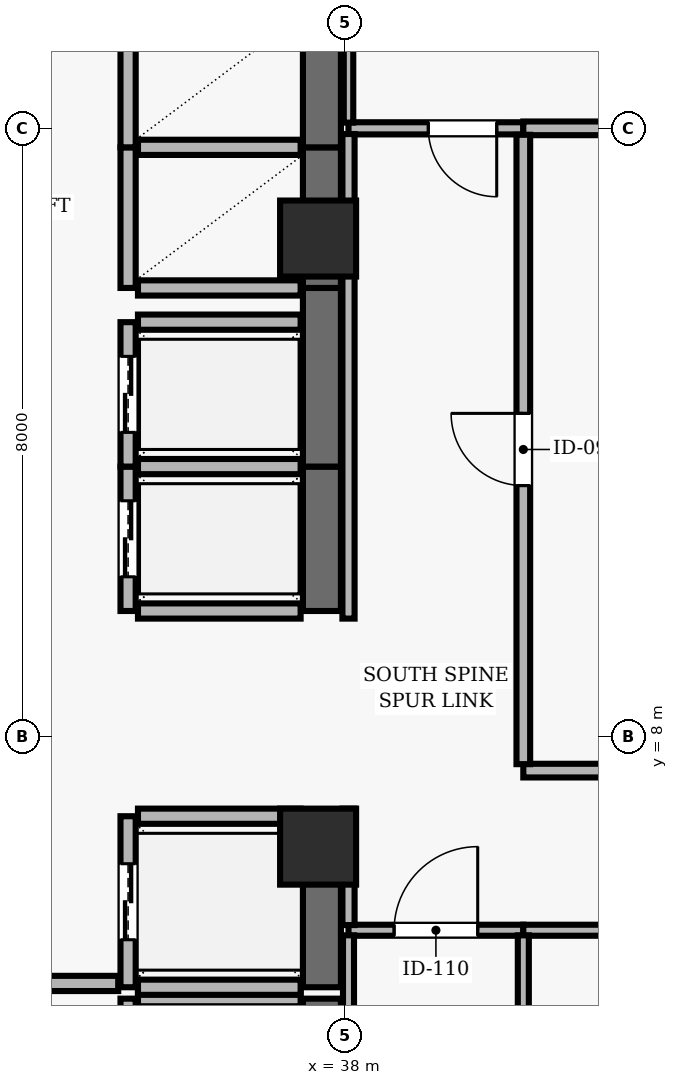
"""IFC4 building model, lengths in metres.
Left out: names, types, materials, properties, quantities, classifications, styles, units other than length and angle.
Written with IfcOpenShell. Run it as: python <this file> out.ifc"""

import sys

from ifc_helpers import new_model, si_unit, direction, frame, frame_2d, origin, origin_2d, place, context, subcontext, project, spatial, rectangle, extrude, element, fill, save


model = new_model("IFC4")
c1 = context("Model", 3, precision=1e-05, world=origin(), true_north=direction((0.0, 1.0)))
c2 = subcontext(c1, "Body", "Model", "MODEL_VIEW")
j1 = project(units=[si_unit("LENGTHUNIT", "METRE"), si_unit("PLANEANGLEUNIT", "RADIAN")], contexts=[c1])
p1 = place(None, origin())
s1 = spatial("IfcSite", under=j1, at=p1, CompositionType="ELEMENT")
p2 = place(p1, origin())
s2 = spatial("IfcBuilding", under=s1, at=p2, CompositionType="ELEMENT")
p3 = place(p2, frame((0.0, 0.0, 207.0)))
s3 = spatial("IfcBuildingStorey", under=s2, at=p3, CompositionType="ELEMENT", Elevation=207.0)
for number, where, z_axis, x_axis in (
    (1, (37.65, 6.55, 0.0), (0.0, 0.0, 1.0), (1.0, 0.0, 0.0)),
    (2, (37.65, 14.55, 0.0), (0.0, 0.0, 1.0), (1.0, 0.0, 0.0)),
):
    element("IfcColumn", number, at=place(p3, frame(where, z_axis=z_axis, x_axis=x_axis)), inside=s3, PredefinedType="COLUMN", context=c2, shape_type="SweptSolid", body=[
        extrude(rectangle(XDim=1.0, YDim=1.0, at=origin_2d()), origin(), (0.0, 0.0, 1.0), 3.9),
    ])
p4 = place(p3, frame((35.15, 4.55, 0.0), z_axis=(0.0, 0.0, 1.0), x_axis=(0.0, -1.0, 0.0)))
e3 = element("IfcWall", 3, at=p4, inside=s3, PredefinedType="SOLIDWALL", context=c2, shape_type="SweptSolid", body=[
    extrude(rectangle(XDim=2.1, YDim=0.2, at=frame_2d((1.05, 0.0))), origin(), (0.0, 0.0, 1.0), 3.69),
])
p5 = place(p4, frame((0.45, 0.0, 0.0)))
e4 = element("IfcOpeningElement", 4, at=p5, cuts=e3, PredefinedType="OPENING", context=c2, shape_type="SweptSolid", body=[
    extrude(rectangle(XDim=1.2, YDim=2.15, at=frame_2d((0.6, 1.075))), frame((0.0, 0.11, 0.0), z_axis=(0.0, -1.0, 0.0), x_axis=(1.0, 0.0, 0.0)), (0.0, 0.0, 1.0), 0.22),
])
p6 = place(p3, frame((37.7, 2.45, 0.0), z_axis=(0.0, 0.0, 1.0), x_axis=(0.0, 1.0, 0.0)))
e5 = element("IfcWall", 5, at=p6, inside=s3, PredefinedType="SHEAR", context=c2, shape_type="SweptSolid", body=[
    extrude(rectangle(XDim=2.1, YDim=0.5, at=frame_2d((1.05, 0.0))), origin(), (0.0, 0.0, 1.0), 3.69),
])
p7 = place(p3, frame((37.42, 4.55, 0.0), z_axis=(0.0, 0.0, 1.0), x_axis=(-1.0, 0.0, 0.0)))
e6 = element("IfcWall", 6, at=p7, inside=s3, PredefinedType="SOLIDWALL", context=c2, shape_type="SweptSolid", body=[
    extrude(rectangle(XDim=2.14, YDim=0.2, at=frame_2d((1.07, 0.0))), origin(), (0.0, 0.0, 1.0), 3.69),
])
p8 = place(p3, frame((35.15, 6.95, 0.0), z_axis=(0.0, 0.0, 1.0), x_axis=(0.0, -1.0, 0.0)))
e7 = element("IfcWall", 7, at=p8, inside=s3, PredefinedType="SOLIDWALL", context=c2, shape_type="SweptSolid", body=[
    extrude(rectangle(XDim=2.25, YDim=0.2, at=frame_2d((1.125, 0.0))), origin(), (0.0, 0.0, 1.0), 3.69),
])
p9 = place(p8, frame((0.625, 0.0, 0.0)))
e8 = element("IfcOpeningElement", 8, at=p9, cuts=e7, PredefinedType="OPENING", context=c2, shape_type="SweptSolid", body=[
    extrude(rectangle(XDim=1.0, YDim=2.1, at=frame_2d((0.5, 1.05))), frame((0.0, 0.11, 0.0), z_axis=(0.0, -1.0, 0.0), x_axis=(1.0, 0.0, 0.0)), (0.0, 0.0, 1.0), 0.22),
])
p10 = place(p3, frame((37.7, 4.7, 0.0), z_axis=(0.0, 0.0, 1.0), x_axis=(0.0, 1.0, 0.0)))
e9 = element("IfcWall", 9, at=p10, inside=s3, PredefinedType="SHEAR", context=c2, shape_type="SweptSolid", body=[
    extrude(rectangle(XDim=2.25, YDim=0.5, at=frame_2d((1.125, 0.0))), origin(), (0.0, 0.0, 1.0), 3.69),
])
for number, where, z_axis, x_axis in (
    (10, (35.28, 4.7, 0.0), (0.0, 0.0, 1.0), (1.0, 0.0, 0.0)),
    (11, (37.42, 6.95, 0.0), (0.0, 0.0, 1.0), (-1.0, 0.0, 0.0)),
):
    element("IfcWall", number, at=place(p3, frame(where, z_axis=z_axis, x_axis=x_axis)), inside=s3, PredefinedType="SOLIDWALL", context=c2, shape_type="SweptSolid", body=[
        extrude(rectangle(XDim=2.14, YDim=0.2, at=frame_2d((1.07, 0.0))), origin(), (0.0, 0.0, 1.0), 3.69),
    ])
p11 = place(p3, frame((35.15, 11.55, 0.0), z_axis=(0.0, 0.0, 1.0), x_axis=(0.0, -1.0, 0.0)))
e12 = element("IfcWall", 12, at=p11, inside=s3, PredefinedType="SOLIDWALL", context=c2, shape_type="SweptSolid", body=[
    extrude(rectangle(XDim=1.9, YDim=0.2, at=frame_2d((0.95, 0.0))), origin(), (0.0, 0.0, 1.0), 3.69),
])
p12 = place(p11, frame((0.45, 0.0, 0.0)))
e13 = element("IfcOpeningElement", 13, at=p12, cuts=e12, PredefinedType="OPENING", context=c2, shape_type="SweptSolid", body=[
    extrude(rectangle(XDim=1.0, YDim=2.1, at=frame_2d((0.5, 1.05))), frame((0.0, 0.11, 0.0), z_axis=(0.0, -1.0, 0.0), x_axis=(1.0, 0.0, 0.0)), (0.0, 0.0, 1.0), 0.22),
])
p13 = place(p3, frame((37.7, 9.65, 0.0), z_axis=(0.0, 0.0, 1.0), x_axis=(0.0, 1.0, 0.0)))
e14 = element("IfcWall", 14, at=p13, inside=s3, PredefinedType="SHEAR", context=c2, shape_type="SweptSolid", body=[
    extrude(rectangle(XDim=1.9, YDim=0.5, at=frame_2d((0.95, 0.0))), origin(), (0.0, 0.0, 1.0), 3.69),
])
for number, where, z_axis, x_axis in (
    (15, (35.28, 9.65, 0.0), (0.0, 0.0, 1.0), (1.0, 0.0, 0.0)),
    (16, (37.42, 11.55, 0.0), (0.0, 0.0, 1.0), (-1.0, 0.0, 0.0)),
):
    element("IfcWall", number, at=place(p3, frame(where, z_axis=z_axis, x_axis=x_axis)), inside=s3, PredefinedType="SOLIDWALL", context=c2, shape_type="SweptSolid", body=[
        extrude(rectangle(XDim=2.14, YDim=0.2, at=frame_2d((1.07, 0.0))), origin(), (0.0, 0.0, 1.0), 3.69),
    ])
p14 = place(p3, frame((35.15, 13.45, 0.0), z_axis=(0.0, 0.0, 1.0), x_axis=(0.0, -1.0, 0.0)))
e17 = element("IfcWall", 17, at=p14, inside=s3, PredefinedType="SOLIDWALL", context=c2, shape_type="SweptSolid", body=[
    extrude(rectangle(XDim=1.9, YDim=0.2, at=frame_2d((0.95, 0.0))), origin(), (0.0, 0.0, 1.0), 3.69),
])
p15 = place(p14, frame((0.45, 0.0, 0.0)))
e18 = element("IfcOpeningElement", 18, at=p15, cuts=e17, PredefinedType="OPENING", context=c2, shape_type="SweptSolid", body=[
    extrude(rectangle(XDim=1.0, YDim=2.1, at=frame_2d((0.5, 1.05))), frame((0.0, 0.11, 0.0), z_axis=(0.0, -1.0, 0.0), x_axis=(1.0, 0.0, 0.0)), (0.0, 0.0, 1.0), 0.22),
])
p16 = place(p3, frame((37.7, 11.55, 0.0), z_axis=(0.0, 0.0, 1.0), x_axis=(0.0, 1.0, 0.0)))
e19 = element("IfcWall", 19, at=p16, inside=s3, PredefinedType="SHEAR", context=c2, shape_type="SweptSolid", body=[
    extrude(rectangle(XDim=2.35, YDim=0.5, at=frame_2d((1.175, 0.0))), origin(), (0.0, 0.0, 1.0), 3.69),
])
p17 = place(p3, frame((37.42, 13.45, 0.0), z_axis=(0.0, 0.0, 1.0), x_axis=(-1.0, 0.0, 0.0)))
e20 = element("IfcWall", 20, at=p17, inside=s3, PredefinedType="SOLIDWALL", context=c2, shape_type="SweptSolid", body=[
    extrude(rectangle(XDim=2.14, YDim=0.2, at=frame_2d((1.07, 0.0))), origin(), (0.0, 0.0, 1.0), 3.69),
])
p18 = place(p3, frame((35.15, 15.75, 0.0), z_axis=(0.0, 0.0, 1.0), x_axis=(0.0, -1.0, 0.0)))
e21 = element("IfcWall", 21, at=p18, inside=s3, PredefinedType="SOLIDWALL", context=c2, shape_type="SweptSolid", body=[
    extrude(rectangle(XDim=1.85, YDim=0.2, at=frame_2d((0.925, 0.0))), origin(), (0.0, 0.0, 1.0), 3.69),
])
p19 = place(p3, frame((37.7, 13.9, 0.0), z_axis=(0.0, 0.0, 1.0), x_axis=(0.0, 1.0, 0.0)))
e22 = element("IfcWall", 22, at=p19, inside=s3, PredefinedType="SHEAR", context=c2, shape_type="SweptSolid", body=[
    extrude(rectangle(XDim=1.85, YDim=0.5, at=frame_2d((0.925, 0.0))), origin(), (0.0, 0.0, 1.0), 3.69),
])
for number, where, z_axis, x_axis in (
    (23, (35.28, 13.9, 0.0), (0.0, 0.0, 1.0), (1.0, 0.0, 0.0)),
    (24, (37.42, 15.75, 0.0), (0.0, 0.0, 1.0), (-1.0, 0.0, 0.0)),
):
    element("IfcWall", number, at=place(p3, frame(where, z_axis=z_axis, x_axis=x_axis)), inside=s3, PredefinedType="SOLIDWALL", context=c2, shape_type="SweptSolid", body=[
        extrude(rectangle(XDim=2.14, YDim=0.2, at=frame_2d((1.07, 0.0))), origin(), (0.0, 0.0, 1.0), 3.69),
    ])
p20 = place(p3, frame((35.15, 17.6, 0.0), z_axis=(0.0, 0.0, 1.0), x_axis=(0.0, -1.0, 0.0)))
e25 = element("IfcWall", 25, at=p20, inside=s3, PredefinedType="SOLIDWALL", context=c2, shape_type="SweptSolid", body=[
    extrude(rectangle(XDim=1.85, YDim=0.2, at=frame_2d((0.925, 0.0))), origin(), (0.0, 0.0, 1.0), 3.69),
])
p21 = place(p3, frame((37.7, 15.75, 0.0), z_axis=(0.0, 0.0, 1.0), x_axis=(0.0, 1.0, 0.0)))
e26 = element("IfcWall", 26, at=p21, inside=s3, PredefinedType="SHEAR", context=c2, shape_type="SweptSolid", body=[
    extrude(rectangle(XDim=1.85, YDim=0.5, at=frame_2d((0.925, 0.0))), origin(), (0.0, 0.0, 1.0), 3.69),
])
p22 = place(p3, frame((35.02, 4.75, 0.0), z_axis=(0.0, 0.0, 1.0), x_axis=(-1.0, 0.0, 0.0)))
e27 = element("IfcWall", 27, at=p22, inside=s3, PredefinedType="SOLIDWALL", context=c2, shape_type="SweptSolid", body=[
    extrude(rectangle(XDim=3.11, YDim=0.2, at=frame_2d((1.555, 0.0))), origin(), (0.0, 0.0, 1.0), 3.69),
])
p23 = place(p22, frame((1.03, 0.0, 0.0)))
e28 = element("IfcOpeningElement", 28, at=p23, cuts=e27, PredefinedType="OPENING", context=c2, shape_type="SweptSolid", body=[
    extrude(rectangle(XDim=1.05, YDim=2.15, at=frame_2d((0.525, 1.075))), frame((0.0, 0.11, 0.0), z_axis=(0.0, -1.0, 0.0), x_axis=(1.0, 0.0, 0.0)), (0.0, 0.0, 1.0), 0.22),
])
p24 = place(p3, frame((38.05, 5.45, 0.0), z_axis=(0.0, 0.0, 1.0), x_axis=(1.0, 0.0, 0.0)))
e29 = element("IfcWall", 29, at=p24, inside=s3, PredefinedType="PARTITIONING", context=c2, shape_type="SweptSolid", body=[
    extrude(rectangle(XDim=2.3, YDim=0.145, at=frame_2d((1.15, 0.0))), origin(), (0.0, 0.0, 1.0), 3.343),
])
p25 = place(p24, frame((0.6, 0.0, 0.0)))
e30 = element("IfcOpeningElement", 30, at=p25, cuts=e29, PredefinedType="OPENING", context=c2, shape_type="SweptSolid", body=[
    extrude(rectangle(XDim=1.1, YDim=2.15, at=frame_2d((0.55, 1.075))), frame((0.0, 0.083, 0.0), z_axis=(0.0, -1.0, 0.0), x_axis=(1.0, 0.0, 0.0)), (0.0, 0.0, 1.0), 0.165),
])
p26 = place(p3, frame((40.35, 5.45, 0.0), z_axis=(0.0, 0.0, 1.0), x_axis=(1.0, 0.0, 0.0)))
e31 = element("IfcWall", 31, at=p26, inside=s3, PredefinedType="PARTITIONING", context=c2, shape_type="SweptSolid", body=[
    extrude(rectangle(XDim=5.65, YDim=0.145, at=frame_2d((2.825, 0.0))), origin(), (0.0, 0.0, 1.0), 3.343),
])
p27 = place(p26, frame((2.275, 0.0, 0.0)))
e32 = element("IfcOpeningElement", 32, at=p27, cuts=e31, PredefinedType="OPENING", context=c2, shape_type="SweptSolid", body=[
    extrude(rectangle(XDim=1.1, YDim=2.15, at=frame_2d((0.55, 1.075))), frame((0.0, 0.083, 0.0), z_axis=(0.0, -1.0, 0.0), x_axis=(1.0, 0.0, 0.0)), (0.0, 0.0, 1.0), 0.165),
])
p28 = place(p3, frame((40.35, 16.0, 0.0), z_axis=(0.0, 0.0, 1.0), x_axis=(-1.0, 0.0, 0.0)))
e33 = element("IfcWall", 33, at=p28, inside=s3, PredefinedType="PARTITIONING", context=c2, shape_type="SweptSolid", body=[
    extrude(rectangle(XDim=2.3, YDim=0.16, at=frame_2d((1.15, 0.0))), origin(), (0.0, 0.0, 1.0), 3.69),
])
p29 = place(p28, frame((0.35, 0.0, 0.0)))
e34 = element("IfcOpeningElement", 34, at=p29, cuts=e33, PredefinedType="OPENING", context=c2, shape_type="SweptSolid", body=[
    extrude(rectangle(XDim=0.9, YDim=2.1, at=frame_2d((0.45, 1.05))), frame((0.0, 0.09, 0.0), z_axis=(0.0, -1.0, 0.0), x_axis=(1.0, 0.0, 0.0)), (0.0, 0.0, 1.0), 0.18),
])
p30 = place(p3, frame((40.35, 16.0, 0.0), z_axis=(0.0, 0.0, 1.0), x_axis=(1.0, 0.0, 0.0)))
e35 = element("IfcWall", 35, at=p30, inside=s3, PredefinedType="PARTITIONING", context=c2, shape_type="SweptSolid", body=[
    extrude(rectangle(XDim=5.155, YDim=0.18, at=frame_2d((2.577, 0.0))), origin(), (0.0, 0.0, 1.0), 3.69),
])
p31 = place(p3, frame((46.0, 7.55, 0.0), z_axis=(0.0, 0.0, 1.0), x_axis=(-1.0, 0.0, 0.0)))
e36 = element("IfcWall", 36, at=p31, inside=s3, PredefinedType="PARTITIONING", context=c2, shape_type="SweptSolid", body=[
    extrude(rectangle(XDim=5.65, YDim=0.18, at=frame_2d((2.825, 0.0))), origin(), (0.0, 0.0, 1.0), 3.139),
])
p32 = place(p3, frame((38.05, 5.383, 0.0), z_axis=(0.0, 0.0, 1.0), x_axis=(0.0, -1.0, 0.0)))
e37 = element("IfcWall", 37, at=p32, inside=s3, PredefinedType="PARTITIONING", context=c2, shape_type="SweptSolid", body=[
    extrude(rectangle(XDim=5.238, YDim=0.145, at=frame_2d((2.619, 0.0))), origin(), (0.0, 0.0, 1.0), 3.139),
])
p33 = place(p3, frame((38.05, 7.05, 0.0), z_axis=(0.0, 0.0, 1.0), x_axis=(0.0, -1.0, 0.0)))
e38 = element("IfcWall", 38, at=p33, inside=s3, PredefinedType="PARTITIONING", context=c2, shape_type="SweptSolid", body=[
    extrude(rectangle(XDim=1.532, YDim=0.16, at=frame_2d((0.766, 0.0))), origin(), (0.0, 0.0, 1.0), 3.139),
])
p34 = place(p3, frame((38.05, 15.925, 0.0), z_axis=(0.0, 0.0, 1.0), x_axis=(0.0, -1.0, 0.0)))
e39 = element("IfcWall", 39, at=p34, inside=s3, PredefinedType="PARTITIONING", context=c2, shape_type="SweptSolid", body=[
    extrude(rectangle(XDim=6.375, YDim=0.16, at=frame_2d((3.188, 0.0))), origin(), (0.0, 0.0, 1.0), 3.139),
])
p35 = place(p3, frame((38.05, 22.538, 0.0), z_axis=(0.0, 0.0, 1.0), x_axis=(0.0, -1.0, 0.0)))
e40 = element("IfcWall", 40, at=p35, inside=s3, PredefinedType="PARTITIONING", context=c2, shape_type="SweptSolid", body=[
    extrude(rectangle(XDim=6.463, YDim=0.125, at=frame_2d((3.231, 0.0))), origin(), (0.0, 0.0, 1.0), 3.139),
])
p36 = place(p3, frame((40.35, 0.09, 0.0), z_axis=(0.0, 0.0, 1.0), x_axis=(0.0, 1.0, 0.0)))
e41 = element("IfcWall", 41, at=p36, inside=s3, PredefinedType="PARTITIONING", context=c2, shape_type="SweptSolid", body=[
    extrude(rectangle(XDim=5.293, YDim=0.145, at=frame_2d((2.646, 0.0))), origin(), (0.0, 0.0, 1.0), 3.69),
])
p37 = place(p3, frame((40.35, 7.635, 0.0), z_axis=(0.0, 0.0, 1.0), x_axis=(0.0, 1.0, 0.0)))
e42 = element("IfcWall", 42, at=p37, inside=s3, PredefinedType="PARTITIONING", context=c2, shape_type="SweptSolid", body=[
    extrude(rectangle(XDim=8.28, YDim=0.18, at=frame_2d((4.14, 0.0))), origin(), (0.0, 0.0, 1.0), 3.343),
])
p38 = place(p37, frame((3.665, 0.0, 0.0)))
e43 = element("IfcOpeningElement", 43, at=p38, cuts=e42, PredefinedType="OPENING", context=c2, shape_type="SweptSolid", body=[
    extrude(rectangle(XDim=0.95, YDim=2.1, at=frame_2d((0.475, 1.05))), frame((0.0, 0.1, 0.0), z_axis=(0.0, -1.0, 0.0), x_axis=(1.0, 0.0, 0.0)), (0.0, 0.0, 1.0), 0.2),
])
p39 = place(p9, origin())
e44 = element("IfcDoor", 44, at=p39, inside=s3, OperationType="DOUBLE_DOOR_SLIDING", PredefinedType="DOOR", context=c2, shape_type="SweptSolid", body=[
    extrude(rectangle(XDim=1.0, YDim=2.1, at=frame_2d((0.5, 1.05))), frame((0.0, 0.025, 0.0), z_axis=(0.0, -1.0, 0.0), x_axis=(1.0, 0.0, 0.0)), (0.0, 0.0, 1.0), 0.05),
])
fill(e8, e44)
p40 = place(p12, origin())
e45 = element("IfcDoor", 45, at=p40, inside=s3, OperationType="DOUBLE_DOOR_SLIDING", PredefinedType="DOOR", context=c2, shape_type="SweptSolid", body=[
    extrude(rectangle(XDim=1.0, YDim=2.1, at=frame_2d((0.5, 1.05))), frame((0.0, 0.025, 0.0), z_axis=(0.0, -1.0, 0.0), x_axis=(1.0, 0.0, 0.0)), (0.0, 0.0, 1.0), 0.05),
])
fill(e13, e45)
p41 = place(p15, origin())
e46 = element("IfcDoor", 46, at=p41, inside=s3, OperationType="DOUBLE_DOOR_SLIDING", PredefinedType="DOOR", context=c2, shape_type="SweptSolid", body=[
    extrude(rectangle(XDim=1.0, YDim=2.1, at=frame_2d((0.5, 1.05))), frame((0.0, 0.025, 0.0), z_axis=(0.0, -1.0, 0.0), x_axis=(1.0, 0.0, 0.0)), (0.0, 0.0, 1.0), 0.05),
])
fill(e18, e46)
p42 = place(p25, origin())
e47 = element("IfcDoor", 47, at=p42, inside=s3, OperationType="SINGLE_SWING_RIGHT", PredefinedType="DOOR", context=c2, shape_type="SweptSolid", body=[
    extrude(rectangle(XDim=1.1, YDim=2.15, at=frame_2d((0.55, 1.075))), frame((0.0, 0.025, 0.0), z_axis=(0.0, -1.0, 0.0), x_axis=(1.0, 0.0, 0.0)), (0.0, 0.0, 1.0), 0.05),
])
fill(e30, e47)
p43 = place(p38, origin())
e48 = element("IfcDoor", 48, at=p43, inside=s3, OperationType="SINGLE_SWING_RIGHT", PredefinedType="DOOR", context=c2, shape_type="SweptSolid", body=[
    extrude(rectangle(XDim=0.95, YDim=2.1, at=frame_2d((0.475, 1.05))), frame((0.0, 0.025, 0.0), z_axis=(0.0, -1.0, 0.0), x_axis=(1.0, 0.0, 0.0)), (0.0, 0.0, 1.0), 0.05),
])
fill(e43, e48)
p44 = place(p29, origin())
e49 = element("IfcDoor", 49, at=p44, inside=s3, OperationType="SINGLE_SWING_LEFT", PredefinedType="DOOR", context=c2, shape_type="SweptSolid", body=[
    extrude(rectangle(XDim=0.9, YDim=2.1, at=frame_2d((0.45, 1.05))), frame((0.0, 0.025, 0.0), z_axis=(0.0, -1.0, 0.0), x_axis=(1.0, 0.0, 0.0)), (0.0, 0.0, 1.0), 0.05),
])
fill(e34, e49)
save(model, sys.argv[1])
